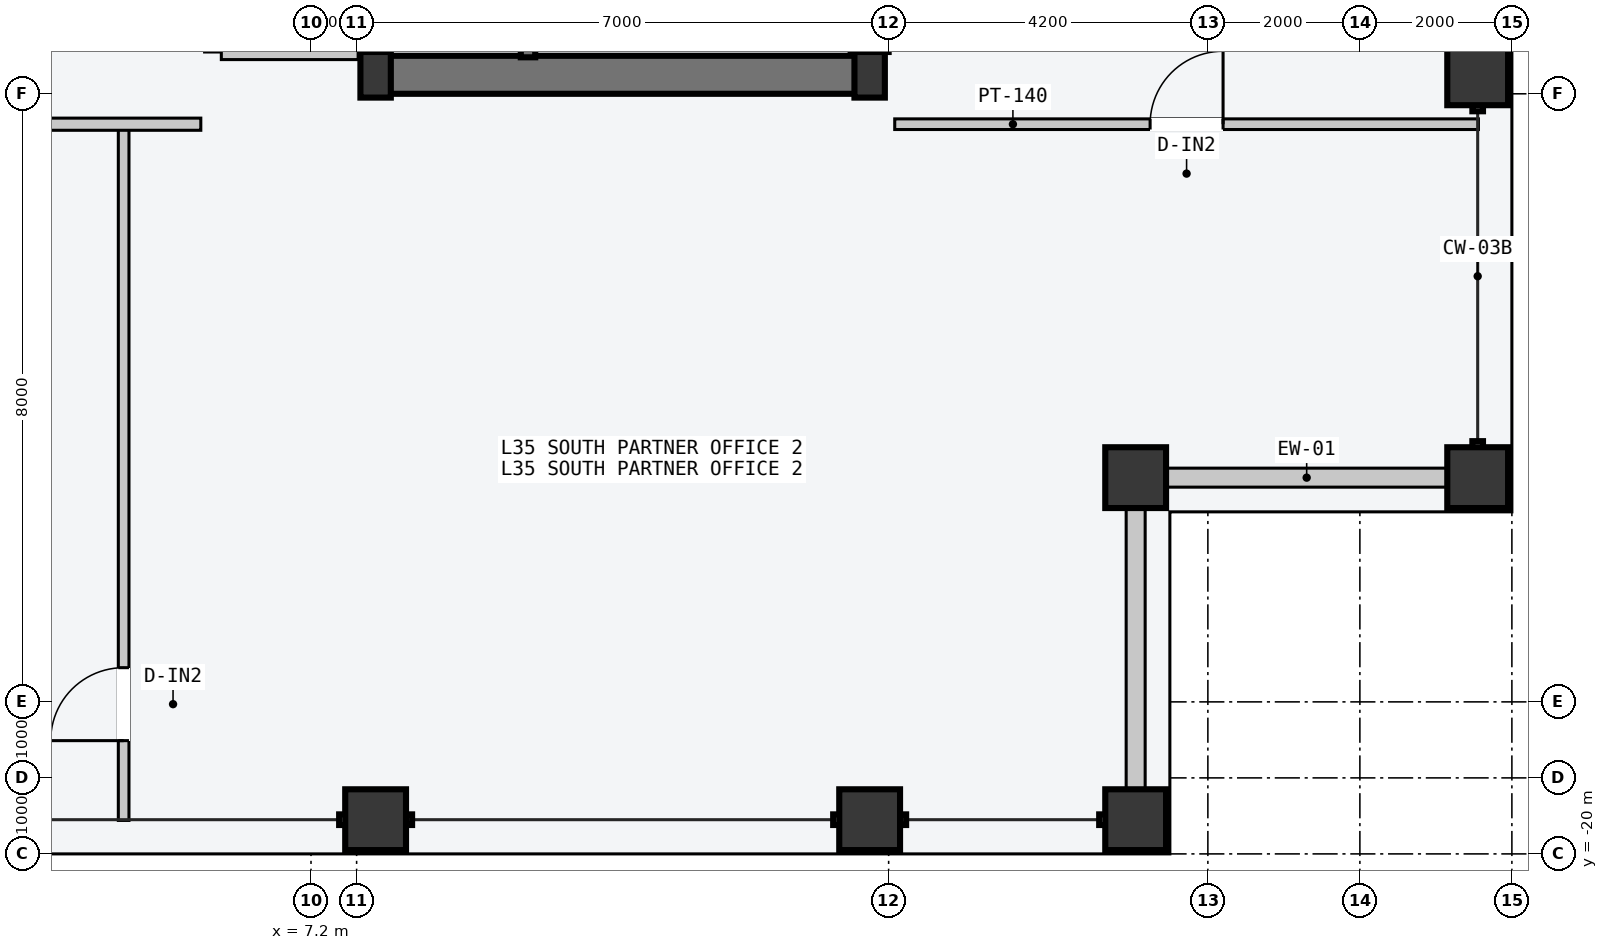
"""IFC4 building model, lengths in metres.
Left out: names, types, materials, properties, quantities, classifications, styles, units other than length and angle.
Written with IfcOpenShell. Run it as: python <this file> out.ifc"""

import sys

from ifc_helpers import new_model, si_unit, direction, frame, frame_2d, origin, origin_2d, place, context, subcontext, project, spatial, rectangle, hollow_rectangle, i_section, extrude, element, fill, save


model = new_model("IFC4")
c1 = context("Model", 3, precision=1e-05, world=origin(), true_north=direction((0.0, 1.0)))
c2 = subcontext(c1, "Body", "Model", "MODEL_VIEW")
j1 = project(units=[si_unit("LENGTHUNIT", "METRE"), si_unit("PLANEANGLEUNIT", "RADIAN")], contexts=[c1])
p1 = place(None, origin())
s1 = spatial("IfcSite", under=j1, at=p1, CompositionType="ELEMENT")
p2 = place(p1, origin())
s2 = spatial("IfcBuilding", under=s1, at=p2, CompositionType="ELEMENT")
p3 = place(p2, frame((0.0, 0.0, 135.0)))
s3 = spatial("IfcBuildingStorey", under=s2, at=p3, CompositionType="ELEMENT", Elevation=135.0)
p4 = place(p3, frame((8.07, -9.75, -0.2), z_axis=(0.0, 0.0, 1.0), x_axis=(1.0, 0.0, 0.0)))
e1 = element("IfcWall", 1, at=p4, inside=s3, PredefinedType="SHEAR", context=c2, shape_type="SweptSolid", body=[
    extrude(rectangle(XDim=6.46, YDim=0.5, at=frame_2d((3.23, 0.0))), origin(), (0.0, 0.0, 1.0), 3.6),
])
for number, where, z_axis, x_axis in (
    (2, (8.05, -9.75, 0.0), (0.0, 0.0, 1.0), (1.0, 0.0, 0.0)),
    (3, (14.55, -9.75, 0.0), (0.0, 0.0, 1.0), (1.0, 0.0, 0.0)),
):
    element("IfcColumn", number, at=place(p3, frame(where, z_axis=z_axis, x_axis=x_axis)), inside=s3, PredefinedType="COLUMN", context=c2, shape_type="SweptSolid", body=[
        extrude(i_section(OverallWidth=0.4, OverallDepth=0.6, WebThickness=0.022, FlangeThickness=0.036, at=origin_2d()), origin(), (0.0, 0.0, 1.0), 3.6),
    ])
for number, where, z_axis, x_axis in (
    (4, (8.05, -19.55, 0.0), (0.0, 0.0, 1.0), (1.0, 0.0, 0.0)),
    (5, (14.55, -19.55, 0.0), (0.0, 0.0, 1.0), (1.0, 0.0, 0.0)),
    (6, (18.05, -19.55, 0.0), (0.0, 0.0, 1.0), (1.0, 0.0, 0.0)),
    (7, (22.55, -15.05, 0.0), (0.0, 0.0, 1.0), (0.0, 1.0, 0.0)),
    (8, (22.55, -9.75, 0.0), (0.0, 0.0, 1.0), (0.0, 1.0, 0.0)),
    (9, (18.05, -15.05, 0.0), (0.0, 0.0, 1.0), (1.0, 0.0, 0.0)),
):
    element("IfcColumn", number, at=place(p3, frame(where, z_axis=z_axis, x_axis=x_axis)), inside=s3, PredefinedType="COLUMN", context=c2, shape_type="SweptSolid", body=[
        extrude(hollow_rectangle(XDim=0.8, YDim=0.8, WallThickness=0.036, at=origin_2d()), origin(), (0.0, 0.0, 1.0), 3.6),
    ])
for number, where, z_axis, x_axis in (
    (10, (18.46, -15.05, 0.0), (0.0, 0.0, 1.0), (1.0, 0.0, 0.0)),
    (11, (18.05, -19.14, 0.0), (0.0, 0.0, 1.0), (0.0, 1.0, 0.0)),
):
    element("IfcWall", number, at=place(p3, frame(where, z_axis=z_axis, x_axis=x_axis)), inside=s3, PredefinedType="STANDARD", context=c2, shape_type="SweptSolid", body=[
        extrude(rectangle(XDim=3.68, YDim=0.25, at=frame_2d((1.84, 0.0))), origin(), (0.0, 0.0, 1.0), 2.75),
    ])
for number, where, z_axis, x_axis in (
    (12, (8.045, -9.52, -0.2), (0.0, 0.0, 1.0), (0.0, 1.0, 0.0)),
    (13, (10.055, -9.52, -0.2), (0.0, 0.0, 1.0), (0.0, 1.0, 0.0)),
):
    element("IfcWall", number, at=place(p3, frame(where, z_axis=z_axis, x_axis=x_axis)), inside=s3, PredefinedType="SOLIDWALL", context=c2, shape_type="SweptSolid", body=[
        extrude(rectangle(XDim=2.12, YDim=0.19, at=frame_2d((1.06, 0.0))), origin(), (0.0, 0.0, 1.0), 3.6),
    ])
p5 = place(p3, frame((6.02, -9.45, 0.0), z_axis=(0.0, 0.0, 1.0), x_axis=(1.0, 0.0, 0.0)))
e14 = element("IfcWall", 14, at=p5, inside=s3, PredefinedType="PARTITIONING", context=c2, shape_type="SweptSolid", body=[
    extrude(rectangle(XDim=1.8, YDim=0.2, at=frame_2d((0.9, 0.0))), origin(), (0.0, 0.0, 1.0), 3.4),
])
p6 = place(p3, frame((4.735, -19.56, 0.0), z_axis=(0.0, 0.0, 1.0), x_axis=(0.0, 1.0, 0.0)))
e15 = element("IfcWall", 15, at=p6, inside=s3, PredefinedType="PARTITIONING", context=c2, shape_type="SweptSolid", body=[
    extrude(rectangle(XDim=9.1, YDim=0.14, at=frame_2d((4.55, 0.0))), origin(), (0.0, 0.0, 1.0), 3.4),
])
p7 = place(p6, frame((1.05, 0.0, 0.0)))
e16 = element("IfcOpeningElement", 16, at=p7, cuts=e15, PredefinedType="OPENING", context=c2, shape_type="SweptSolid", body=[
    extrude(rectangle(XDim=0.96, YDim=2.18, at=frame_2d((0.48, 1.09))), frame((0.0, 0.08, 0.0), z_axis=(0.0, -1.0, 0.0), x_axis=(1.0, 0.0, 0.0)), (0.0, 0.0, 1.0), 0.16),
])
p8 = place(p3, frame((-5.75, -10.4, 0.0), z_axis=(0.0, 0.0, 1.0), x_axis=(1.0, 0.0, 0.0)))
e17 = element("IfcWall", 17, at=p8, inside=s3, PredefinedType="PARTITIONING", context=c2, shape_type="SweptSolid", body=[
    extrude(rectangle(XDim=11.5, YDim=0.16, at=frame_2d((5.75, 0.0))), origin(), (0.0, 0.0, 1.0), 3.4),
])
p9 = place(p8, frame((4.622, 0.0, 0.0)))
e18 = element("IfcOpeningElement", 18, at=p9, cuts=e17, PredefinedType="OPENING", context=c2, shape_type="SweptSolid", body=[
    extrude(rectangle(XDim=1.24, YDim=2.24, at=frame_2d((0.62, 1.12))), frame((0.0, 0.09, 0.0), z_axis=(0.0, -1.0, 0.0), x_axis=(1.0, 0.0, 0.0)), (0.0, 0.0, 1.0), 0.18),
])
p10 = place(p3, frame((14.88, -10.4, 0.0), z_axis=(0.0, 0.0, 1.0), x_axis=(1.0, 0.0, 0.0)))
e19 = element("IfcWall", 19, at=p10, inside=s3, PredefinedType="PARTITIONING", context=c2, shape_type="SweptSolid", body=[
    extrude(rectangle(XDim=7.68, YDim=0.14, at=frame_2d((3.84, 0.0))), origin(), (0.0, 0.0, 1.0), 3.4),
])
p11 = place(p10, frame((3.36, 0.0, 0.0)))
e20 = element("IfcOpeningElement", 20, at=p11, cuts=e19, PredefinedType="OPENING", context=c2, shape_type="SweptSolid", body=[
    extrude(rectangle(XDim=0.96, YDim=2.18, at=frame_2d((0.48, 1.09))), frame((0.0, 0.08, 0.0), z_axis=(0.0, -1.0, 0.0), x_axis=(1.0, 0.0, 0.0)), (0.0, 0.0, 1.0), 0.16),
])
p12 = place(p7, origin())
e21 = element("IfcDoor", 21, at=p12, inside=s3, OperationType="SINGLE_SWING_LEFT", PredefinedType="DOOR", context=c2, shape_type="SweptSolid", body=[
    extrude(rectangle(XDim=0.96, YDim=2.18, at=frame_2d((0.48, 1.09))), frame((0.0, 0.025, 0.0), z_axis=(0.0, -1.0, 0.0), x_axis=(1.0, 0.0, 0.0)), (0.0, 0.0, 1.0), 0.05),
])
fill(e16, e21)
p13 = place(p11, origin())
e22 = element("IfcDoor", 22, at=p13, inside=s3, OperationType="SINGLE_SWING_RIGHT", PredefinedType="DOOR", context=c2, shape_type="SweptSolid", body=[
    extrude(rectangle(XDim=0.96, YDim=2.18, at=frame_2d((0.48, 1.09))), frame((0.0, 0.025, 0.0), z_axis=(0.0, -1.0, 0.0), x_axis=(1.0, 0.0, 0.0)), (0.0, 0.0, 1.0), 0.05),
])
fill(e20, e22)
save(model, sys.argv[1])
